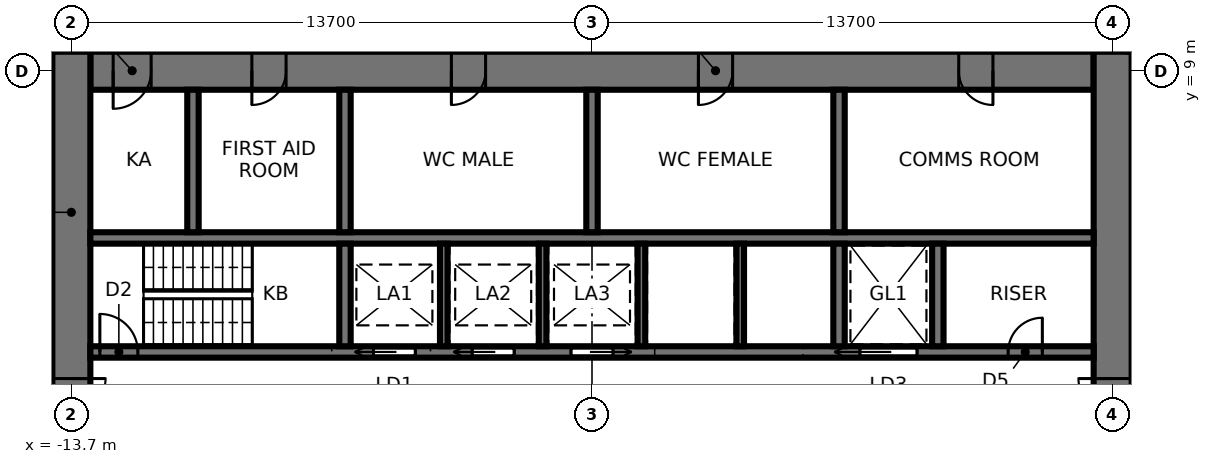
"""IFC4 building model, lengths in metres.
Left out: names, types, materials, properties, quantities, classifications, styles, units other than length and angle.
Written with IfcOpenShell. Run it as: python <this file> out.ifc"""

import sys

from ifc_helpers import new_model, si_unit, direction, frame, frame_2d, origin, place, context, subcontext, project, spatial, rectangle, extrude, element, fill, save


model = new_model("IFC4")
c1 = context("Model", 3, precision=1e-05, world=origin(), true_north=direction((0.0, 1.0)))
c2 = subcontext(c1, "Body", "Model", "MODEL_VIEW")
j1 = project(units=[si_unit("LENGTHUNIT", "METRE"), si_unit("PLANEANGLEUNIT", "RADIAN")], contexts=[c1])
p1 = place(None, origin())
s1 = spatial("IfcSite", under=j1, at=p1, CompositionType="ELEMENT")
p2 = place(p1, origin())
s2 = spatial("IfcBuilding", under=s1, at=p2, CompositionType="ELEMENT")
p3 = place(p2, frame((0.0, 0.0, 82.6)))
s3 = spatial("IfcBuildingStorey", under=s2, at=p3, CompositionType="ELEMENT", Elevation=82.6)
p4 = place(p3, frame((13.2, 9.0, 0.0), z_axis=(0.0, 0.0, 1.0), x_axis=(-1.0, 0.0, 0.0)))
e1 = element("IfcWall", 1, at=p4, inside=s3, PredefinedType="SHEAR", context=c2, shape_type="SweptSolid", body=[
    extrude(rectangle(XDim=26.4, YDim=1.0, at=frame_2d((13.2, 0.0))), origin(), (0.0, 0.0, 1.0), 4.2),
])
p5 = place(p4, frame((2.65, 0.0, 0.0)))
e2 = element("IfcOpeningElement", 2, at=p5, cuts=e1, PredefinedType="OPENING", context=c2, shape_type="SweptSolid", body=[
    extrude(rectangle(XDim=0.9, YDim=2.1, at=frame_2d((0.45, 1.05))), frame((0.0, 0.51, 0.0), z_axis=(0.0, -1.0, 0.0), x_axis=(1.0, 0.0, 0.0)), (0.0, 0.0, 1.0), 1.02),
])
p6 = place(p4, frame((9.5, 0.0, 0.0)))
e3 = element("IfcOpeningElement", 3, at=p6, cuts=e1, PredefinedType="OPENING", context=c2, shape_type="SweptSolid", body=[
    extrude(rectangle(XDim=0.9, YDim=2.1, at=frame_2d((0.45, 1.05))), frame((0.0, 0.51, 0.0), z_axis=(0.0, -1.0, 0.0), x_axis=(1.0, 0.0, 0.0)), (0.0, 0.0, 1.0), 1.02),
])
p7 = place(p4, frame((16.0, 0.0, 0.0)))
e4 = element("IfcOpeningElement", 4, at=p7, cuts=e1, PredefinedType="OPENING", context=c2, shape_type="SweptSolid", body=[
    extrude(rectangle(XDim=0.9, YDim=2.1, at=frame_2d((0.45, 1.05))), frame((0.0, 0.51, 0.0), z_axis=(0.0, -1.0, 0.0), x_axis=(1.0, 0.0, 0.0)), (0.0, 0.0, 1.0), 1.02),
])
p8 = place(p4, frame((21.25, 0.0, 0.0)))
e5 = element("IfcOpeningElement", 5, at=p8, cuts=e1, PredefinedType="OPENING", context=c2, shape_type="SweptSolid", body=[
    extrude(rectangle(XDim=0.9, YDim=2.1, at=frame_2d((0.45, 1.05))), frame((0.0, 0.51, 0.0), z_axis=(0.0, -1.0, 0.0), x_axis=(1.0, 0.0, 0.0)), (0.0, 0.0, 1.0), 1.02),
])
p9 = place(p4, frame((24.8, 0.0, 0.0)))
e6 = element("IfcOpeningElement", 6, at=p9, cuts=e1, PredefinedType="OPENING", context=c2, shape_type="SweptSolid", body=[
    extrude(rectangle(XDim=1.0, YDim=2.1, at=frame_2d((0.5, 1.05))), frame((0.0, 0.51, 0.0), z_axis=(0.0, -1.0, 0.0), x_axis=(1.0, 0.0, 0.0)), (0.0, 0.0, 1.0), 1.02),
])
p10 = place(p3, frame((13.7, -9.5, 0.0), z_axis=(0.0, 0.0, 1.0), x_axis=(0.0, 1.0, 0.0)))
e7 = element("IfcWall", 7, at=p10, inside=s3, PredefinedType="SHEAR", context=c2, shape_type="SweptSolid", body=[
    extrude(rectangle(XDim=19.0, YDim=1.0, at=frame_2d((9.5, 0.0))), origin(), (0.0, 0.0, 1.0), 4.2),
])
p11 = place(p10, frame((8.6, 0.0, 0.0)))
e8 = element("IfcOpeningElement", 8, at=p11, cuts=e7, PredefinedType="OPENING", context=c2, shape_type="SweptSolid", body=[
    extrude(rectangle(XDim=1.8, YDim=2.4, at=frame_2d((0.9, 1.2))), frame((0.0, 0.51, 0.0), z_axis=(0.0, -1.0, 0.0), x_axis=(1.0, 0.0, 0.0)), (0.0, 0.0, 1.0), 1.02),
])
p12 = place(p3, frame((-13.7, 9.5, 0.0), z_axis=(0.0, 0.0, 1.0), x_axis=(0.0, -1.0, 0.0)))
e9 = element("IfcWall", 9, at=p12, inside=s3, PredefinedType="SHEAR", context=c2, shape_type="SweptSolid", body=[
    extrude(rectangle(XDim=19.0, YDim=1.0, at=frame_2d((9.5, 0.0))), origin(), (0.0, 0.0, 1.0), 4.2),
])
p13 = place(p12, frame((8.6, 0.0, 0.0)))
e10 = element("IfcOpeningElement", 10, at=p13, cuts=e9, PredefinedType="OPENING", context=c2, shape_type="SweptSolid", body=[
    extrude(rectangle(XDim=1.8, YDim=2.4, at=frame_2d((0.9, 1.2))), frame((0.0, 0.51, 0.0), z_axis=(0.0, -1.0, 0.0), x_axis=(1.0, 0.0, 0.0)), (0.0, 0.0, 1.0), 1.02),
])
p14 = place(p3, frame((-13.2, 1.6, 0.0), z_axis=(0.0, 0.0, 1.0), x_axis=(1.0, 0.0, 0.0)))
e11 = element("IfcWall", 11, at=p14, inside=s3, PredefinedType="SHEAR", context=c2, shape_type="SweptSolid", body=[
    extrude(rectangle(XDim=26.4, YDim=0.3, at=frame_2d((13.2, 0.0))), origin(), (0.0, 0.0, 1.0), 4.2),
])
p15 = place(p14, frame((0.25, 0.0, 0.0)))
e12 = element("IfcOpeningElement", 12, at=p15, cuts=e11, PredefinedType="OPENING", context=c2, shape_type="SweptSolid", body=[
    extrude(rectangle(XDim=1.0, YDim=2.1, at=frame_2d((0.5, 1.05))), frame((0.0, 0.16, 0.0), z_axis=(0.0, -1.0, 0.0), x_axis=(1.0, 0.0, 0.0)), (0.0, 0.0, 1.0), 0.32),
])
p16 = place(p14, frame((20.25, 0.0, 0.0)))
e13 = element("IfcOpeningElement", 13, at=p16, cuts=e11, PredefinedType="OPENING", context=c2, shape_type="SweptSolid", body=[
    extrude(rectangle(XDim=1.5, YDim=2.4, at=frame_2d((0.75, 1.2))), frame((0.0, 0.16, 0.0), z_axis=(0.0, -1.0, 0.0), x_axis=(1.0, 0.0, 0.0)), (0.0, 0.0, 1.0), 0.32),
])
p17 = place(p14, frame((7.45, 0.0, 0.0)))
e14 = element("IfcOpeningElement", 14, at=p17, cuts=e11, PredefinedType="OPENING", context=c2, shape_type="SweptSolid", body=[
    extrude(rectangle(XDim=1.1, YDim=2.3, at=frame_2d((0.55, 1.15))), frame((0.0, 0.16, 0.0), z_axis=(0.0, -1.0, 0.0), x_axis=(1.0, 0.0, 0.0)), (0.0, 0.0, 1.0), 0.32),
])
p18 = place(p14, frame((10.05, 0.0, 0.0)))
e15 = element("IfcOpeningElement", 15, at=p18, cuts=e11, PredefinedType="OPENING", context=c2, shape_type="SweptSolid", body=[
    extrude(rectangle(XDim=1.1, YDim=2.3, at=frame_2d((0.55, 1.15))), frame((0.0, 0.16, 0.0), z_axis=(0.0, -1.0, 0.0), x_axis=(1.0, 0.0, 0.0)), (0.0, 0.0, 1.0), 0.32),
])
p19 = place(p14, frame((12.65, 0.0, 0.0)))
e16 = element("IfcOpeningElement", 16, at=p19, cuts=e11, PredefinedType="OPENING", context=c2, shape_type="SweptSolid", body=[
    extrude(rectangle(XDim=1.1, YDim=2.3, at=frame_2d((0.55, 1.15))), frame((0.0, 0.16, 0.0), z_axis=(0.0, -1.0, 0.0), x_axis=(1.0, 0.0, 0.0)), (0.0, 0.0, 1.0), 0.32),
])
p20 = place(p14, frame((24.15, 0.0, 0.0)))
e17 = element("IfcOpeningElement", 17, at=p20, cuts=e11, PredefinedType="OPENING", context=c2, shape_type="SweptSolid", body=[
    extrude(rectangle(XDim=0.9, YDim=2.1, at=frame_2d((0.45, 1.05))), frame((0.0, 0.16, 0.0), z_axis=(0.0, -1.0, 0.0), x_axis=(1.0, 0.0, 0.0)), (0.0, 0.0, 1.0), 0.32),
])
p21 = place(p3, frame((-13.2, 4.6, 0.0), z_axis=(0.0, 0.0, 1.0), x_axis=(1.0, 0.0, 0.0)))
e18 = element("IfcWall", 18, at=p21, inside=s3, PredefinedType="SHEAR", context=c2, shape_type="SweptSolid", body=[
    extrude(rectangle(XDim=26.4, YDim=0.3, at=frame_2d((13.2, 0.0))), origin(), (0.0, 0.0, 1.0), 4.2),
])
p22 = place(p3, frame((-6.5, 1.75, 0.0), z_axis=(0.0, 0.0, 1.0), x_axis=(0.0, 1.0, 0.0)))
e19 = element("IfcWall", 19, at=p22, inside=s3, PredefinedType="SHEAR", context=c2, shape_type="SweptSolid", body=[
    extrude(rectangle(XDim=2.7, YDim=0.3, at=frame_2d((1.35, 0.0))), origin(), (0.0, 0.0, 1.0), 4.2),
])
p23 = place(p3, frame((-6.5, 4.75, 0.0), z_axis=(0.0, 0.0, 1.0), x_axis=(0.0, 1.0, 0.0)))
e20 = element("IfcWall", 20, at=p23, inside=s3, PredefinedType="SHEAR", context=c2, shape_type="SweptSolid", body=[
    extrude(rectangle(XDim=3.75, YDim=0.3, at=frame_2d((1.875, 0.0))), origin(), (0.0, 0.0, 1.0), 4.2),
])
p24 = place(p3, frame((6.5, 1.75, 0.0), z_axis=(0.0, 0.0, 1.0), x_axis=(0.0, 1.0, 0.0)))
e21 = element("IfcWall", 21, at=p24, inside=s3, PredefinedType="SHEAR", context=c2, shape_type="SweptSolid", body=[
    extrude(rectangle(XDim=2.7, YDim=0.3, at=frame_2d((1.35, 0.0))), origin(), (0.0, 0.0, 1.0), 4.2),
])
p25 = place(p3, frame((6.5, 4.75, 0.0), z_axis=(0.0, 0.0, 1.0), x_axis=(0.0, 1.0, 0.0)))
e22 = element("IfcWall", 22, at=p25, inside=s3, PredefinedType="SHEAR", context=c2, shape_type="SweptSolid", body=[
    extrude(rectangle(XDim=3.75, YDim=0.3, at=frame_2d((1.875, 0.0))), origin(), (0.0, 0.0, 1.0), 4.2),
])
for number, where, z_axis, x_axis in (
    (23, (-3.9, 1.75, 0.0), (0.0, 0.0, 1.0), (0.0, 1.0, 0.0)),
    (24, (-1.3, 1.75, 0.0), (0.0, 0.0, 1.0), (0.0, 1.0, 0.0)),
    (25, (1.3, 1.75, 0.0), (0.0, 0.0, 1.0), (0.0, 1.0, 0.0)),
    (26, (3.9, 1.75, 0.0), (0.0, 0.0, 1.0), (0.0, 1.0, 0.0)),
):
    element("IfcWall", number, at=place(p3, frame(where, z_axis=z_axis, x_axis=x_axis)), inside=s3, PredefinedType="SHEAR", context=c2, shape_type="SweptSolid", body=[
        extrude(rectangle(XDim=2.7, YDim=0.2, at=frame_2d((1.35, 0.0))), origin(), (0.0, 0.0, 1.0), 4.2),
    ])
for number, where, z_axis, x_axis in (
    (27, (0.0, 4.75, 0.0), (0.0, 0.0, 1.0), (0.0, 1.0, 0.0)),
    (28, (-10.5, 4.75, 0.0), (0.0, 0.0, 1.0), (0.0, 1.0, 0.0)),
):
    element("IfcWall", number, at=place(p3, frame(where, z_axis=z_axis, x_axis=x_axis)), inside=s3, PredefinedType="SHEAR", context=c2, shape_type="SweptSolid", body=[
        extrude(rectangle(XDim=3.75, YDim=0.3, at=frame_2d((1.875, 0.0))), origin(), (0.0, 0.0, 1.0), 4.2),
    ])
p26 = place(p3, frame((9.1, 1.75, 0.0), z_axis=(0.0, 0.0, 1.0), x_axis=(0.0, 1.0, 0.0)))
e29 = element("IfcWall", 29, at=p26, inside=s3, PredefinedType="SHEAR", context=c2, shape_type="SweptSolid", body=[
    extrude(rectangle(XDim=2.7, YDim=0.3, at=frame_2d((1.35, 0.0))), origin(), (0.0, 0.0, 1.0), 4.2),
])
p27 = place(p3, frame((14.2, 9.5, 0.0), z_axis=(0.0, 0.0, 1.0), x_axis=(0.0, 1.0, 0.0)))
e30 = element("IfcWall", 30, at=p27, inside=s3, PredefinedType="PARTITIONING", context=c2, shape_type="SweptSolid", body=[
    extrude(rectangle(XDim=1.8, YDim=0.15, at=frame_2d((0.9, 0.0))), origin(), (0.0, 0.0, 1.0), 4.0),
])
p28 = place(p13, origin())
e31 = element("IfcDoor", 31, at=p28, inside=s3, OperationType="DOUBLE_DOOR_SINGLE_SWING", PredefinedType="DOOR", context=c2, shape_type="SweptSolid", body=[
    extrude(rectangle(XDim=1.72, YDim=2.36, at=frame_2d((0.9, 1.18))), frame((0.0, 0.025, 0.0), z_axis=(0.0, -1.0, 0.0), x_axis=(1.0, 0.0, 0.0)), (0.0, 0.0, 1.0), 0.05),
    extrude(rectangle(XDim=0.04, YDim=2.4, at=frame_2d((0.02, 1.2))), frame((0.0, 0.25, 0.0), z_axis=(0.0, -1.0, 0.0), x_axis=(1.0, 0.0, 0.0)), (0.0, 0.0, 1.0), 0.5),
    extrude(rectangle(XDim=0.04, YDim=2.4, at=frame_2d((1.78, 1.2))), frame((0.0, 0.25, 0.0), z_axis=(0.0, -1.0, 0.0), x_axis=(1.0, 0.0, 0.0)), (0.0, 0.0, 1.0), 0.5),
    extrude(rectangle(XDim=1.72, YDim=0.04, at=frame_2d((0.9, 2.38))), frame((0.0, 0.25, 0.0), z_axis=(0.0, -1.0, 0.0), x_axis=(1.0, 0.0, 0.0)), (0.0, 0.0, 1.0), 0.5),
])
fill(e10, e31)
p29 = place(p11, origin())
e32 = element("IfcDoor", 32, at=p29, inside=s3, OperationType="DOUBLE_DOOR_SINGLE_SWING", PredefinedType="DOOR", context=c2, shape_type="SweptSolid", body=[
    extrude(rectangle(XDim=1.72, YDim=2.36, at=frame_2d((0.9, 1.18))), frame((0.0, 0.025, 0.0), z_axis=(0.0, -1.0, 0.0), x_axis=(1.0, 0.0, 0.0)), (0.0, 0.0, 1.0), 0.05),
    extrude(rectangle(XDim=0.04, YDim=2.4, at=frame_2d((0.02, 1.2))), frame((0.0, 0.25, 0.0), z_axis=(0.0, -1.0, 0.0), x_axis=(1.0, 0.0, 0.0)), (0.0, 0.0, 1.0), 0.5),
    extrude(rectangle(XDim=0.04, YDim=2.4, at=frame_2d((1.78, 1.2))), frame((0.0, 0.25, 0.0), z_axis=(0.0, -1.0, 0.0), x_axis=(1.0, 0.0, 0.0)), (0.0, 0.0, 1.0), 0.5),
    extrude(rectangle(XDim=1.72, YDim=0.04, at=frame_2d((0.9, 2.38))), frame((0.0, 0.25, 0.0), z_axis=(0.0, -1.0, 0.0), x_axis=(1.0, 0.0, 0.0)), (0.0, 0.0, 1.0), 0.5),
])
fill(e8, e32)
p30 = place(p15, origin())
e33 = element("IfcDoor", 33, at=p30, inside=s3, OperationType="SINGLE_SWING_LEFT", PredefinedType="DOOR", context=c2, shape_type="SweptSolid", body=[
    extrude(rectangle(XDim=1.0, YDim=2.1, at=frame_2d((0.5, 1.05))), frame((0.0, 0.025, 0.0), z_axis=(0.0, -1.0, 0.0), x_axis=(1.0, 0.0, 0.0)), (0.0, 0.0, 1.0), 0.05),
])
fill(e12, e33)
p31 = place(p16, origin())
e34 = element("IfcDoor", 34, at=p31, inside=s3, OperationType="SLIDING_TO_LEFT", PredefinedType="DOOR", context=c2, shape_type="SweptSolid", body=[
    extrude(rectangle(XDim=1.5, YDim=2.4, at=frame_2d((0.75, 1.2))), frame((0.0, 0.025, 0.0), z_axis=(0.0, -1.0, 0.0), x_axis=(1.0, 0.0, 0.0)), (0.0, 0.0, 1.0), 0.05),
])
fill(e13, e34)
p32 = place(p17, origin())
e35 = element("IfcDoor", 35, at=p32, inside=s3, OperationType="SLIDING_TO_LEFT", PredefinedType="DOOR", context=c2, shape_type="SweptSolid", body=[
    extrude(rectangle(XDim=1.1, YDim=2.3, at=frame_2d((0.55, 1.15))), frame((0.0, 0.025, 0.0), z_axis=(0.0, -1.0, 0.0), x_axis=(1.0, 0.0, 0.0)), (0.0, 0.0, 1.0), 0.05),
])
fill(e14, e35)
p33 = place(p18, origin())
e36 = element("IfcDoor", 36, at=p33, inside=s3, OperationType="SLIDING_TO_LEFT", PredefinedType="DOOR", context=c2, shape_type="SweptSolid", body=[
    extrude(rectangle(XDim=1.1, YDim=2.3, at=frame_2d((0.55, 1.15))), frame((0.0, 0.025, 0.0), z_axis=(0.0, -1.0, 0.0), x_axis=(1.0, 0.0, 0.0)), (0.0, 0.0, 1.0), 0.05),
])
fill(e15, e36)
p34 = place(p19, origin())
e37 = element("IfcDoor", 37, at=p34, inside=s3, OperationType="SLIDING_TO_RIGHT", PredefinedType="DOOR", context=c2, shape_type="SweptSolid", body=[
    extrude(rectangle(XDim=1.1, YDim=2.3, at=frame_2d((0.55, 1.15))), frame((0.0, 0.025, 0.0), z_axis=(0.0, -1.0, 0.0), x_axis=(1.0, 0.0, 0.0)), (0.0, 0.0, 1.0), 0.05),
])
fill(e16, e37)
p35 = place(p20, origin())
e38 = element("IfcDoor", 38, at=p35, inside=s3, OperationType="SINGLE_SWING_RIGHT", PredefinedType="DOOR", context=c2, shape_type="SweptSolid", body=[
    extrude(rectangle(XDim=0.9, YDim=2.1, at=frame_2d((0.45, 1.05))), frame((0.0, 0.025, 0.0), z_axis=(0.0, -1.0, 0.0), x_axis=(1.0, 0.0, 0.0)), (0.0, 0.0, 1.0), 0.05),
])
fill(e17, e38)
p36 = place(p5, origin())
e39 = element("IfcDoor", 39, at=p36, inside=s3, OperationType="SINGLE_SWING_LEFT", PredefinedType="DOOR", context=c2, shape_type="SweptSolid", body=[
    extrude(rectangle(XDim=0.82, YDim=2.06, at=frame_2d((0.45, 1.03))), frame((0.0, 0.025, 0.0), z_axis=(0.0, -1.0, 0.0), x_axis=(1.0, 0.0, 0.0)), (0.0, 0.0, 1.0), 0.05),
    extrude(rectangle(XDim=0.04, YDim=2.1, at=frame_2d((0.02, 1.05))), frame((0.0, 0.25, 0.0), z_axis=(0.0, -1.0, 0.0), x_axis=(1.0, 0.0, 0.0)), (0.0, 0.0, 1.0), 0.5),
    extrude(rectangle(XDim=0.04, YDim=2.1, at=frame_2d((0.88, 1.05))), frame((0.0, 0.25, 0.0), z_axis=(0.0, -1.0, 0.0), x_axis=(1.0, 0.0, 0.0)), (0.0, 0.0, 1.0), 0.5),
    extrude(rectangle(XDim=0.82, YDim=0.04, at=frame_2d((0.45, 2.08))), frame((0.0, 0.25, 0.0), z_axis=(0.0, -1.0, 0.0), x_axis=(1.0, 0.0, 0.0)), (0.0, 0.0, 1.0), 0.5),
])
fill(e2, e39)
p37 = place(p6, origin())
e40 = element("IfcDoor", 40, at=p37, inside=s3, OperationType="SINGLE_SWING_RIGHT", PredefinedType="DOOR", context=c2, shape_type="SweptSolid", body=[
    extrude(rectangle(XDim=0.82, YDim=2.06, at=frame_2d((0.45, 1.03))), frame((0.0, 0.025, 0.0), z_axis=(0.0, -1.0, 0.0), x_axis=(1.0, 0.0, 0.0)), (0.0, 0.0, 1.0), 0.05),
    extrude(rectangle(XDim=0.04, YDim=2.1, at=frame_2d((0.02, 1.05))), frame((0.0, 0.25, 0.0), z_axis=(0.0, -1.0, 0.0), x_axis=(1.0, 0.0, 0.0)), (0.0, 0.0, 1.0), 0.5),
    extrude(rectangle(XDim=0.04, YDim=2.1, at=frame_2d((0.88, 1.05))), frame((0.0, 0.25, 0.0), z_axis=(0.0, -1.0, 0.0), x_axis=(1.0, 0.0, 0.0)), (0.0, 0.0, 1.0), 0.5),
    extrude(rectangle(XDim=0.82, YDim=0.04, at=frame_2d((0.45, 2.08))), frame((0.0, 0.25, 0.0), z_axis=(0.0, -1.0, 0.0), x_axis=(1.0, 0.0, 0.0)), (0.0, 0.0, 1.0), 0.5),
])
fill(e3, e40)
p38 = place(p7, origin())
e41 = element("IfcDoor", 41, at=p38, inside=s3, OperationType="SINGLE_SWING_RIGHT", PredefinedType="DOOR", context=c2, shape_type="SweptSolid", body=[
    extrude(rectangle(XDim=0.82, YDim=2.06, at=frame_2d((0.45, 1.03))), frame((0.0, 0.025, 0.0), z_axis=(0.0, -1.0, 0.0), x_axis=(1.0, 0.0, 0.0)), (0.0, 0.0, 1.0), 0.05),
    extrude(rectangle(XDim=0.04, YDim=2.1, at=frame_2d((0.02, 1.05))), frame((0.0, 0.25, 0.0), z_axis=(0.0, -1.0, 0.0), x_axis=(1.0, 0.0, 0.0)), (0.0, 0.0, 1.0), 0.5),
    extrude(rectangle(XDim=0.04, YDim=2.1, at=frame_2d((0.88, 1.05))), frame((0.0, 0.25, 0.0), z_axis=(0.0, -1.0, 0.0), x_axis=(1.0, 0.0, 0.0)), (0.0, 0.0, 1.0), 0.5),
    extrude(rectangle(XDim=0.82, YDim=0.04, at=frame_2d((0.45, 2.08))), frame((0.0, 0.25, 0.0), z_axis=(0.0, -1.0, 0.0), x_axis=(1.0, 0.0, 0.0)), (0.0, 0.0, 1.0), 0.5),
])
fill(e4, e41)
p39 = place(p8, origin())
e42 = element("IfcDoor", 42, at=p39, inside=s3, OperationType="SINGLE_SWING_RIGHT", PredefinedType="DOOR", context=c2, shape_type="SweptSolid", body=[
    extrude(rectangle(XDim=0.82, YDim=2.06, at=frame_2d((0.45, 1.03))), frame((0.0, 0.025, 0.0), z_axis=(0.0, -1.0, 0.0), x_axis=(1.0, 0.0, 0.0)), (0.0, 0.0, 1.0), 0.05),
    extrude(rectangle(XDim=0.04, YDim=2.1, at=frame_2d((0.02, 1.05))), frame((0.0, 0.25, 0.0), z_axis=(0.0, -1.0, 0.0), x_axis=(1.0, 0.0, 0.0)), (0.0, 0.0, 1.0), 0.5),
    extrude(rectangle(XDim=0.04, YDim=2.1, at=frame_2d((0.88, 1.05))), frame((0.0, 0.25, 0.0), z_axis=(0.0, -1.0, 0.0), x_axis=(1.0, 0.0, 0.0)), (0.0, 0.0, 1.0), 0.5),
    extrude(rectangle(XDim=0.82, YDim=0.04, at=frame_2d((0.45, 2.08))), frame((0.0, 0.25, 0.0), z_axis=(0.0, -1.0, 0.0), x_axis=(1.0, 0.0, 0.0)), (0.0, 0.0, 1.0), 0.5),
])
fill(e5, e42)
p40 = place(p9, origin())
e43 = element("IfcDoor", 43, at=p40, inside=s3, OperationType="SINGLE_SWING_RIGHT", PredefinedType="DOOR", context=c2, shape_type="SweptSolid", body=[
    extrude(rectangle(XDim=0.92, YDim=2.06, at=frame_2d((0.5, 1.03))), frame((0.0, 0.025, 0.0), z_axis=(0.0, -1.0, 0.0), x_axis=(1.0, 0.0, 0.0)), (0.0, 0.0, 1.0), 0.05),
    extrude(rectangle(XDim=0.04, YDim=2.1, at=frame_2d((0.02, 1.05))), frame((0.0, 0.25, 0.0), z_axis=(0.0, -1.0, 0.0), x_axis=(1.0, 0.0, 0.0)), (0.0, 0.0, 1.0), 0.5),
    extrude(rectangle(XDim=0.04, YDim=2.1, at=frame_2d((0.98, 1.05))), frame((0.0, 0.25, 0.0), z_axis=(0.0, -1.0, 0.0), x_axis=(1.0, 0.0, 0.0)), (0.0, 0.0, 1.0), 0.5),
    extrude(rectangle(XDim=0.92, YDim=0.04, at=frame_2d((0.5, 2.08))), frame((0.0, 0.25, 0.0), z_axis=(0.0, -1.0, 0.0), x_axis=(1.0, 0.0, 0.0)), (0.0, 0.0, 1.0), 0.5),
])
fill(e6, e43)
save(model, sys.argv[1])
